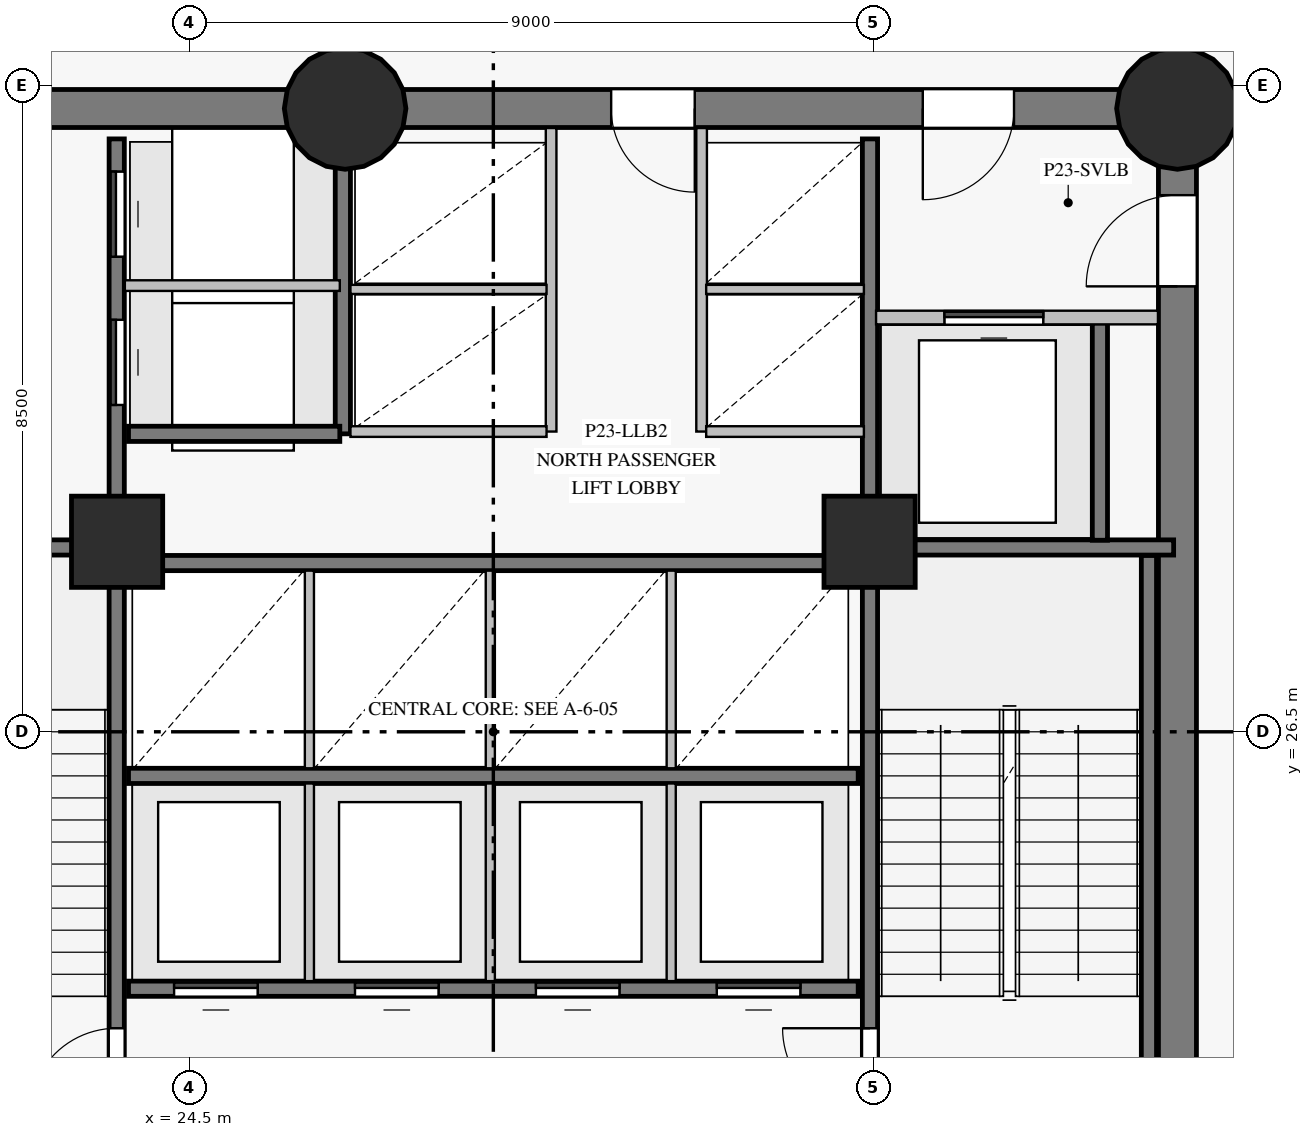
"""IFC4 building model, lengths in metres.
Left out: names, types, materials, properties, quantities, classifications, styles, units other than length and angle.
Written with IfcOpenShell. Run it as: python <this file> out.ifc"""

import sys

from ifc_helpers import new_model, si_unit, direction, frame, frame_2d, origin, origin_with_axes, origin_2d, place, context, subcontext, project, spatial, rectangle, circle, extrude, source, transform, mapped, element, fill, save


model = new_model("IFC4")
c1 = context("Model", 3, precision=1e-05, world=origin(), true_north=direction((0.0, 1.0)))
c2 = subcontext(c1, "Body", "Model", "MODEL_VIEW")
j1 = project(units=[si_unit("LENGTHUNIT", "METRE"), si_unit("PLANEANGLEUNIT", "RADIAN")], contexts=[c1])
p1 = place(None, origin())
s1 = spatial("IfcSite", under=j1, at=p1, CompositionType="ELEMENT")
p2 = place(p1, origin())
s2 = spatial("IfcBuilding", under=s1, at=p2, CompositionType="ELEMENT")
p3 = place(p2, frame((0.0, 0.0, 87.7)))
s3 = spatial("IfcBuildingStorey", under=s2, at=p3, CompositionType="ELEMENT", Elevation=87.7)
p4 = place(p3, frame((37.5, 18.3, 0.0), z_axis=(0.0, 0.0, 1.0), x_axis=(0.0, 1.0, 0.0)))
e1 = element("IfcWall", 1, at=p4, inside=s3, PredefinedType="SHEAR", context=c2, shape_type="SweptSolid", body=[
    extrude(rectangle(XDim=16.4, YDim=0.5, at=frame_2d((8.2, 0.0))), origin(), (0.0, 0.0, 1.0), 4.275),
])
p5 = place(p4, frame((14.06, 0.0, 0.0)))
e2 = element("IfcOpeningElement", 2, at=p5, cuts=e1, PredefinedType="OPENING", context=c2, shape_type="SweptSolid", body=[
    extrude(rectangle(XDim=1.2, YDim=2.15, at=frame_2d((0.6, 1.075))), frame((0.0, 0.26, 0.0), z_axis=(0.0, -1.0, 0.0), x_axis=(1.0, 0.0, 0.0)), (0.0, 0.0, 1.0), 0.52),
])
p6 = place(p3, frame((37.5, 34.7, 0.0), z_axis=(0.0, 0.0, 1.0), x_axis=(-1.0, 0.0, 0.0)))
e3 = element("IfcWall", 3, at=p6, inside=s3, PredefinedType="SHEAR", context=c2, shape_type="SweptSolid", body=[
    extrude(rectangle(XDim=10.95, YDim=0.5, at=frame_2d((5.475, 0.0))), origin(), (0.0, 0.0, 1.0), 4.275),
])
p7 = place(p6, frame((2.15, 0.0, 0.0)))
e4 = element("IfcOpeningElement", 4, at=p7, cuts=e3, PredefinedType="OPENING", context=c2, shape_type="SweptSolid", body=[
    extrude(rectangle(XDim=1.2, YDim=2.15, at=frame_2d((0.6, 1.075))), frame((0.0, 0.26, 0.0), z_axis=(0.0, -1.0, 0.0), x_axis=(1.0, 0.0, 0.0)), (0.0, 0.0, 1.0), 0.52),
])
p8 = place(p6, frame((6.35, 0.0, 0.0)))
e5 = element("IfcOpeningElement", 5, at=p8, cuts=e3, PredefinedType="OPENING", context=c2, shape_type="SweptSolid", body=[
    extrude(rectangle(XDim=1.1, YDim=2.15, at=frame_2d((0.55, 1.075))), frame((0.0, 0.26, 0.0), z_axis=(0.0, -1.0, 0.0), x_axis=(1.0, 0.0, 0.0)), (0.0, 0.0, 1.0), 0.52),
])
p9 = place(p3, frame((26.55, 34.7, 0.0), z_axis=(0.0, 0.0, 1.0), x_axis=(-1.0, 0.0, 0.0)))
e6 = element("IfcWall", 6, at=p9, inside=s3, PredefinedType="SHEAR", context=c2, shape_type="SweptSolid", body=[
    extrude(rectangle(XDim=7.05, YDim=0.5, at=frame_2d((3.525, 0.0))), origin(), (0.0, 0.0, 1.0), 4.275),
])
p10 = place(p9, frame((4.25, 0.0, 0.0)))
e7 = element("IfcOpeningElement", 7, at=p10, cuts=e6, PredefinedType="OPENING", context=c2, shape_type="SweptSolid", body=[
    extrude(rectangle(XDim=1.1, YDim=2.15, at=frame_2d((0.55, 1.075))), frame((0.0, 0.26, 0.0), z_axis=(0.0, -1.0, 0.0), x_axis=(1.0, 0.0, 0.0)), (0.0, 0.0, 1.0), 0.52),
])
m1 = source(origin_with_axes(), c2, "Body", "SweptSolid", [
    extrude(circle(Radius=0.8, at=origin_2d()), origin(), (0.0, 0.0, 1.0), 4.5),
])
for number, where, z_axis, x_axis in (
    (8, (26.55, 34.7, 0.0), (0.0, 0.0, 1.0), (1.0, 0.0, 0.0)),
    (9, (37.5, 34.7, 0.0), (0.0, 0.0, 1.0), (1.0, 0.0, 0.0)),
):
    element("IfcColumn", number, at=place(p3, frame(where, z_axis=z_axis, x_axis=x_axis)), inside=s3, PredefinedType="COLUMN", context=c2, shape_type="MappedRepresentation", body=[
        mapped(m1, transform((0.0, 0.0, 0.0), scale=1.0)),
    ])
m2 = source(origin_with_axes(), c2, "Body", "SweptSolid", [
    extrude(rectangle(XDim=1.2, YDim=1.2, at=origin_2d()), origin(), (0.0, 0.0, 1.0), 4.5),
])
for number, where, z_axis, x_axis in (
    (10, (23.55, 29.0, 0.0), (0.0, 0.0, 1.0), (1.0, 0.0, 0.0)),
    (11, (33.45, 29.0, 0.0), (0.0, 0.0, 1.0), (1.0, 0.0, 0.0)),
):
    element("IfcColumn", number, at=place(p3, frame(where, z_axis=z_axis, x_axis=x_axis)), inside=s3, PredefinedType="COLUMN", context=c2, shape_type="MappedRepresentation", body=[
        mapped(m2, transform((0.0, 0.0, 0.0), scale=1.0)),
    ])
p11 = place(p3, frame((23.545, 18.7, 0.0), z_axis=(0.0, 0.0, 1.0), x_axis=(0.0, 1.0, 0.0)))
e12 = element("IfcWall", 12, at=p11, inside=s3, PredefinedType="SHEAR", context=c2, shape_type="SweptSolid", body=[
    extrude(rectangle(XDim=15.6, YDim=0.2, at=frame_2d((7.8, 0.0))), origin(), (0.0, 0.0, 1.0), 4.275),
])
p12 = place(p11, frame((2.75, 0.0, 0.0)))
e13 = element("IfcOpeningElement", 13, at=p12, cuts=e12, PredefinedType="OPENING", context=c2, shape_type="SweptSolid", body=[
    extrude(rectangle(XDim=1.15, YDim=2.15, at=frame_2d((0.575, 1.075))), frame((0.0, 0.11, 0.0), z_axis=(0.0, -1.0, 0.0), x_axis=(1.0, 0.0, 0.0)), (0.0, 0.0, 1.0), 0.22),
])
p13 = place(p11, frame((0.14, 0.0, 0.0)))
e14 = element("IfcOpeningElement", 14, at=p13, cuts=e12, PredefinedType="OPENING", context=c2, shape_type="SweptSolid", body=[
    extrude(rectangle(XDim=0.88, YDim=2.1, at=frame_2d((0.44, 1.05))), frame((0.0, 0.11, 0.0), z_axis=(0.0, -1.0, 0.0), x_axis=(1.0, 0.0, 0.0)), (0.0, 0.0, 1.0), 0.22),
])
p14 = place(p11, frame((1.36, 0.0, 0.0)))
e15 = element("IfcOpeningElement", 15, at=p14, cuts=e12, PredefinedType="OPENING", context=c2, shape_type="SweptSolid", body=[
    extrude(rectangle(XDim=0.88, YDim=2.1, at=frame_2d((0.44, 1.05))), frame((0.0, 0.11, 0.0), z_axis=(0.0, -1.0, 0.0), x_axis=(1.0, 0.0, 0.0)), (0.0, 0.0, 1.0), 0.22),
])
p15 = place(p11, frame((12.1, 0.0, 0.0)))
e16 = element("IfcOpeningElement", 16, at=p15, cuts=e12, PredefinedType="OPENING", context=c2, shape_type="SweptSolid", body=[
    extrude(rectangle(XDim=1.12, YDim=2.15, at=frame_2d((0.56, 1.075))), frame((0.0, 0.11, 0.0), z_axis=(0.0, -1.0, 0.0), x_axis=(1.0, 0.0, 0.0)), (0.0, 0.0, 1.0), 0.22),
])
p16 = place(p11, frame((14.05, 0.0, 0.0)))
e17 = element("IfcOpeningElement", 17, at=p16, cuts=e12, PredefinedType="OPENING", context=c2, shape_type="SweptSolid", body=[
    extrude(rectangle(XDim=1.12, YDim=2.15, at=frame_2d((0.56, 1.075))), frame((0.0, 0.11, 0.0), z_axis=(0.0, -1.0, 0.0), x_axis=(1.0, 0.0, 0.0)), (0.0, 0.0, 1.0), 0.22),
])
p17 = place(p3, frame((33.455, 18.7, 0.0), z_axis=(0.0, 0.0, 1.0), x_axis=(0.0, 1.0, 0.0)))
e18 = element("IfcWall", 18, at=p17, inside=s3, PredefinedType="SHEAR", context=c2, shape_type="SweptSolid", body=[
    extrude(rectangle(XDim=15.6, YDim=0.2, at=frame_2d((7.8, 0.0))), origin(), (0.0, 0.0, 1.0), 4.275),
])
p18 = place(p17, frame((2.75, 0.0, 0.0)))
e19 = element("IfcOpeningElement", 19, at=p18, cuts=e18, PredefinedType="OPENING", context=c2, shape_type="SweptSolid", body=[
    extrude(rectangle(XDim=1.15, YDim=2.15, at=frame_2d((0.575, 1.075))), frame((0.0, 0.11, 0.0), z_axis=(0.0, -1.0, 0.0), x_axis=(1.0, 0.0, 0.0)), (0.0, 0.0, 1.0), 0.22),
])
p19 = place(p17, frame((0.55, 0.0, 0.0)))
e20 = element("IfcOpeningElement", 20, at=p19, cuts=e18, PredefinedType="OPENING", context=c2, shape_type="SweptSolid", body=[
    extrude(rectangle(XDim=0.94, YDim=2.1, at=frame_2d((0.47, 1.05))), frame((0.0, 0.11, 0.0), z_axis=(0.0, -1.0, 0.0), x_axis=(1.0, 0.0, 0.0)), (0.0, 0.0, 1.0), 0.22),
])
p20 = place(p3, frame((23.7, 23.12, 0.0), z_axis=(0.0, 0.0, 1.0), x_axis=(1.0, 0.0, 0.0)))
e21 = element("IfcWall", 21, at=p20, inside=s3, PredefinedType="SHEAR", context=c2, shape_type="SweptSolid", body=[
    extrude(rectangle(XDim=9.6, YDim=0.2, at=frame_2d((4.8, 0.0))), origin(), (0.0, 0.0, 1.0), 4.275),
])
p21 = place(p20, frame((0.6, 0.0, 0.0)))
e22 = element("IfcOpeningElement", 22, at=p21, cuts=e21, PredefinedType="OPENING", context=c2, shape_type="SweptSolid", body=[
    extrude(rectangle(XDim=1.1, YDim=2.15, at=frame_2d((0.55, 1.075))), frame((0.0, 0.11, 0.0), z_axis=(0.0, -1.0, 0.0), x_axis=(1.0, 0.0, 0.0)), (0.0, 0.0, 1.0), 0.22),
])
p22 = place(p20, frame((2.98, 0.0, 0.0)))
e23 = element("IfcOpeningElement", 23, at=p22, cuts=e21, PredefinedType="OPENING", context=c2, shape_type="SweptSolid", body=[
    extrude(rectangle(XDim=1.1, YDim=2.15, at=frame_2d((0.55, 1.075))), frame((0.0, 0.11, 0.0), z_axis=(0.0, -1.0, 0.0), x_axis=(1.0, 0.0, 0.0)), (0.0, 0.0, 1.0), 0.22),
])
p23 = place(p20, frame((5.36, 0.0, 0.0)))
e24 = element("IfcOpeningElement", 24, at=p23, cuts=e21, PredefinedType="OPENING", context=c2, shape_type="SweptSolid", body=[
    extrude(rectangle(XDim=1.1, YDim=2.15, at=frame_2d((0.55, 1.075))), frame((0.0, 0.11, 0.0), z_axis=(0.0, -1.0, 0.0), x_axis=(1.0, 0.0, 0.0)), (0.0, 0.0, 1.0), 0.22),
])
p24 = place(p20, frame((7.74, 0.0, 0.0)))
e25 = element("IfcOpeningElement", 25, at=p24, cuts=e21, PredefinedType="OPENING", context=c2, shape_type="SweptSolid", body=[
    extrude(rectangle(XDim=1.1, YDim=2.15, at=frame_2d((0.55, 1.075))), frame((0.0, 0.11, 0.0), z_axis=(0.0, -1.0, 0.0), x_axis=(1.0, 0.0, 0.0)), (0.0, 0.0, 1.0), 0.22),
])
for number, where, z_axis, x_axis in (
    (26, (23.7, 25.92, 0.0), (0.0, 0.0, 1.0), (1.0, 0.0, 0.0)),
    (27, (23.7, 28.72, 0.0), (0.0, 0.0, 1.0), (1.0, 0.0, 0.0)),
):
    element("IfcWall", number, at=place(p3, frame(where, z_axis=z_axis, x_axis=x_axis)), inside=s3, PredefinedType="SHEAR", context=c2, shape_type="SweptSolid", body=[
        extrude(rectangle(XDim=9.6, YDim=0.2, at=frame_2d((4.8, 0.0))), origin(), (0.0, 0.0, 1.0), 4.275),
    ])
p25 = place(p3, frame((37.125, 21.32, 0.0), z_axis=(0.0, 0.0, 1.0), x_axis=(0.0, 1.0, 0.0)))
e28 = element("IfcWall", 28, at=p25, inside=s3, PredefinedType="SHEAR", context=c2, shape_type="SweptSolid", body=[
    extrude(rectangle(XDim=7.5, YDim=0.2, at=frame_2d((3.75, 0.0))), origin(), (0.0, 0.0, 1.0), 4.275),
])
for number, where, z_axis, x_axis in (
    (29, (33.455, 28.925, 0.0), (0.0, 0.0, 1.0), (1.0, 0.0, 0.0)),
    (30, (19.55, 28.925, 0.0), (0.0, 0.0, 1.0), (1.0, 0.0, 0.0)),
):
    element("IfcWall", number, at=place(p3, frame(where, z_axis=z_axis, x_axis=x_axis)), inside=s3, PredefinedType="SHEAR", context=c2, shape_type="SweptSolid", body=[
        extrude(rectangle(XDim=3.995, YDim=0.2, at=frame_2d((1.998, 0.0))), origin(), (0.0, 0.0, 1.0), 4.275),
    ])
p26 = place(p3, frame((26.52, 30.42, 0.0), z_axis=(0.0, 0.0, 1.0), x_axis=(0.0, 1.0, 0.0)))
e31 = element("IfcWall", 31, at=p26, inside=s3, PredefinedType="SHEAR", context=c2, shape_type="SweptSolid", body=[
    extrude(rectangle(XDim=3.86, YDim=0.2, at=frame_2d((1.93, 0.0))), origin(), (0.0, 0.0, 1.0), 4.275),
])
p27 = place(p3, frame((36.48, 29.02, 0.0), z_axis=(0.0, 0.0, 1.0), x_axis=(0.0, 1.0, 0.0)))
e32 = element("IfcWall", 32, at=p27, inside=s3, PredefinedType="SHEAR", context=c2, shape_type="SweptSolid", body=[
    extrude(rectangle(XDim=2.86, YDim=0.2, at=frame_2d((1.43, 0.0))), origin(), (0.0, 0.0, 1.0), 4.275),
])
p28 = place(p3, frame((23.7, 30.42, 0.0), z_axis=(0.0, 0.0, 1.0), x_axis=(1.0, 0.0, 0.0)))
e33 = element("IfcWall", 33, at=p28, inside=s3, PredefinedType="SHEAR", context=c2, shape_type="SweptSolid", body=[
    extrude(rectangle(XDim=2.78, YDim=0.2, at=frame_2d((1.39, 0.0))), origin(), (0.0, 0.0, 1.0), 4.275),
])
for number, where, z_axis, x_axis in (
    (34, (29.26, 30.45, 0.0), (0.0, 0.0, 1.0), (0.0, 1.0, 0.0)),
    (35, (31.24, 30.45, 0.0), (0.0, 0.0, 1.0), (0.0, 1.0, 0.0)),
):
    element("IfcWall", number, at=place(p3, frame(where, z_axis=z_axis, x_axis=x_axis)), inside=s3, PredefinedType="PARTITIONING", context=c2, shape_type="SweptSolid", body=[
        extrude(rectangle(XDim=3.993, YDim=0.14, at=frame_2d((1.997, 0.0))), origin(), (0.0, 0.0, 1.0), 4.275),
    ])
p29 = place(p3, frame((33.535, 31.95, 0.0), z_axis=(0.0, 0.0, 1.0), x_axis=(1.0, 0.0, 0.0)))
e36 = element("IfcWall", 36, at=p29, inside=s3, PredefinedType="PARTITIONING", context=c2, shape_type="SweptSolid", body=[
    extrude(rectangle(XDim=3.709, YDim=0.18, at=frame_2d((1.854, 0.0))), origin(), (0.0, 0.0, 1.0), 4.275),
])
p30 = place(p29, frame((0.9, 0.0, 0.0)))
e37 = element("IfcOpeningElement", 37, at=p30, cuts=e36, PredefinedType="OPENING", context=c2, shape_type="SweptSolid", body=[
    extrude(rectangle(XDim=1.3, YDim=2.2, at=frame_2d((0.65, 1.1))), frame((0.0, 0.1, 0.0), z_axis=(0.0, -1.0, 0.0), x_axis=(1.0, 0.0, 0.0)), (0.0, 0.0, 1.0), 0.2),
])
p31 = place(p3, frame((23.652, 32.37, 0.0), z_axis=(0.0, 0.0, 1.0), x_axis=(1.0, 0.0, 0.0)))
e38 = element("IfcWall", 38, at=p31, inside=s3, PredefinedType="PARTITIONING", context=c2, shape_type="SweptSolid", body=[
    extrude(rectangle(XDim=2.828, YDim=0.14, at=frame_2d((1.414, 0.0))), origin(), (0.0, 0.0, 1.0), 4.275),
])
for number, where, z_axis, x_axis in (
    (39, (26.08, 23.22, 0.0), (0.0, 0.0, 1.0), (0.0, 1.0, 0.0)),
    (40, (28.46, 23.22, 0.0), (0.0, 0.0, 1.0), (0.0, 1.0, 0.0)),
    (41, (30.84, 23.22, 0.0), (0.0, 0.0, 1.0), (0.0, 1.0, 0.0)),
    (42, (26.08, 26.02, 0.0), (0.0, 0.0, 1.0), (0.0, 1.0, 0.0)),
    (43, (28.46, 26.02, 0.0), (0.0, 0.0, 1.0), (0.0, 1.0, 0.0)),
    (44, (30.84, 26.02, 0.0), (0.0, 0.0, 1.0), (0.0, 1.0, 0.0)),
):
    element("IfcWall", number, at=place(p3, frame(where, z_axis=z_axis, x_axis=x_axis)), inside=s3, PredefinedType="PARTITIONING", context=c2, shape_type="SweptSolid", body=[
        extrude(rectangle(XDim=2.6, YDim=0.12, at=frame_2d((1.3, 0.0))), origin(), (0.0, 0.0, 1.0), 4.275),
    ])
p32 = place(p3, frame((26.62, 30.45, 0.0), z_axis=(0.0, 0.0, 1.0), x_axis=(1.0, 0.0, 0.0)))
e45 = element("IfcWall", 45, at=p32, inside=s3, PredefinedType="PARTITIONING", context=c2, shape_type="SweptSolid", body=[
    extrude(rectangle(XDim=2.58, YDim=0.14, at=frame_2d((1.29, 0.0))), origin(), (0.0, 0.0, 1.0), 4.275),
])
p33 = place(p3, frame((26.62, 32.32, 0.0), z_axis=(0.0, 0.0, 1.0), x_axis=(1.0, 0.0, 0.0)))
e46 = element("IfcWall", 46, at=p33, inside=s3, PredefinedType="PARTITIONING", context=c2, shape_type="SweptSolid", body=[
    extrude(rectangle(XDim=2.58, YDim=0.12, at=frame_2d((1.29, 0.0))), origin(), (0.0, 0.0, 1.0), 4.275),
])
p34 = place(p3, frame((31.3, 30.45, 0.0), z_axis=(0.0, 0.0, 1.0), x_axis=(1.0, 0.0, 0.0)))
e47 = element("IfcWall", 47, at=p34, inside=s3, PredefinedType="PARTITIONING", context=c2, shape_type="SweptSolid", body=[
    extrude(rectangle(XDim=2.075, YDim=0.14, at=frame_2d((1.038, 0.0))), origin(), (0.0, 0.0, 1.0), 4.275),
])
p35 = place(p3, frame((31.3, 32.32, 0.0), z_axis=(0.0, 0.0, 1.0), x_axis=(1.0, 0.0, 0.0)))
e48 = element("IfcWall", 48, at=p35, inside=s3, PredefinedType="PARTITIONING", context=c2, shape_type="SweptSolid", body=[
    extrude(rectangle(XDim=2.075, YDim=0.12, at=frame_2d((1.038, 0.0))), origin(), (0.0, 0.0, 1.0), 4.275),
])
m3 = source(origin_with_axes(), c2, "Body", "SweptSolid", [
    extrude(rectangle(XDim=1.15, YDim=2.15, at=frame_2d((0.575, 1.075))), frame((0.0, 0.025, 0.0), z_axis=(0.0, -1.0, 0.0), x_axis=(1.0, 0.0, 0.0)), (0.0, 0.0, 1.0), 0.05),
])
p36 = place(p12, origin())
e49 = element("IfcDoor", 49, at=p36, inside=s3, OperationType="SINGLE_SWING_LEFT", PredefinedType="DOOR", context=c2, shape_type="MappedRepresentation", body=[
    mapped(m3, transform((0.0, 0.0, 0.0), scale=1.0)),
])
fill(e13, e49)
p37 = place(p18, origin())
e50 = element("IfcDoor", 50, at=p37, inside=s3, OperationType="SINGLE_SWING_RIGHT", PredefinedType="DOOR", context=c2, shape_type="MappedRepresentation", body=[
    mapped(m3, transform((0.0, 0.0, 0.0), scale=1.0)),
])
fill(e19, e50)
m4 = source(origin_with_axes(), c2, "Body", "SweptSolid", [
    extrude(rectangle(XDim=1.2, YDim=2.15, at=frame_2d((0.6, 1.075))), frame((0.0, 0.025, 0.0), z_axis=(0.0, -1.0, 0.0), x_axis=(1.0, 0.0, 0.0)), (0.0, 0.0, 1.0), 0.05),
])
p38 = place(p5, origin())
e51 = element("IfcDoor", 51, at=p38, inside=s3, OperationType="SINGLE_SWING_LEFT", PredefinedType="DOOR", context=c2, shape_type="MappedRepresentation", body=[
    mapped(m4, transform((0.0, 0.0, 0.0), scale=1.0)),
])
fill(e2, e51)
p39 = place(p7, origin())
e52 = element("IfcDoor", 52, at=p39, inside=s3, OperationType="SINGLE_SWING_RIGHT", PredefinedType="DOOR", context=c2, shape_type="MappedRepresentation", body=[
    mapped(m4, transform((0.0, 0.0, 0.0), scale=1.0)),
])
fill(e4, e52)
m5 = source(origin_with_axes(), c2, "Body", "SweptSolid", [
    extrude(rectangle(XDim=1.3, YDim=2.2, at=frame_2d((0.65, 1.1))), frame((0.0, 0.025, 0.0), z_axis=(0.0, -1.0, 0.0), x_axis=(1.0, 0.0, 0.0)), (0.0, 0.0, 1.0), 0.05),
])
p40 = place(p30, origin())
e53 = element("IfcDoor", 53, at=p40, inside=s3, OperationType="SLIDING_TO_LEFT", PredefinedType="DOOR", context=c2, shape_type="MappedRepresentation", body=[
    mapped(m5, transform((0.0, 0.0, 0.0), scale=1.0)),
])
fill(e37, e53)
m6 = source(origin_with_axes(), c2, "Body", "SweptSolid", [
    extrude(rectangle(XDim=1.1, YDim=2.15, at=frame_2d((0.55, 1.075))), frame((0.0, 0.025, 0.0), z_axis=(0.0, -1.0, 0.0), x_axis=(1.0, 0.0, 0.0)), (0.0, 0.0, 1.0), 0.05),
])
p41 = place(p21, origin())
e54 = element("IfcDoor", 54, at=p41, inside=s3, OperationType="SLIDING_TO_LEFT", PredefinedType="DOOR", context=c2, shape_type="MappedRepresentation", body=[
    mapped(m6, transform((0.0, 0.0, 0.0), scale=1.0)),
])
fill(e22, e54)
p42 = place(p22, origin())
e55 = element("IfcDoor", 55, at=p42, inside=s3, OperationType="SLIDING_TO_RIGHT", PredefinedType="DOOR", context=c2, shape_type="MappedRepresentation", body=[
    mapped(m6, transform((0.0, 0.0, 0.0), scale=1.0)),
])
fill(e23, e55)
p43 = place(p23, origin())
e56 = element("IfcDoor", 56, at=p43, inside=s3, OperationType="SLIDING_TO_LEFT", PredefinedType="DOOR", context=c2, shape_type="MappedRepresentation", body=[
    mapped(m6, transform((0.0, 0.0, 0.0), scale=1.0)),
])
fill(e24, e56)
p44 = place(p24, origin())
e57 = element("IfcDoor", 57, at=p44, inside=s3, OperationType="SLIDING_TO_RIGHT", PredefinedType="DOOR", context=c2, shape_type="MappedRepresentation", body=[
    mapped(m6, transform((0.0, 0.0, 0.0), scale=1.0)),
])
fill(e25, e57)
p45 = place(p8, origin())
e58 = element("IfcDoor", 58, at=p45, inside=s3, OperationType="SINGLE_SWING_LEFT", PredefinedType="DOOR", context=c2, shape_type="MappedRepresentation", body=[
    mapped(m6, transform((0.0, 0.0, 0.0), scale=1.0)),
])
fill(e5, e58)
m7 = source(origin_with_axes(), c2, "Body", "SweptSolid", [
    extrude(rectangle(XDim=1.12, YDim=2.15, at=frame_2d((0.56, 1.075))), frame((0.0, 0.025, 0.0), z_axis=(0.0, -1.0, 0.0), x_axis=(1.0, 0.0, 0.0)), (0.0, 0.0, 1.0), 0.05),
])
p46 = place(p15, origin())
e59 = element("IfcDoor", 59, at=p46, inside=s3, OperationType="SLIDING_TO_LEFT", PredefinedType="DOOR", context=c2, shape_type="MappedRepresentation", body=[
    mapped(m7, transform((0.0, 0.0, 0.0), scale=1.0)),
])
fill(e16, e59)
p47 = place(p16, origin())
e60 = element("IfcDoor", 60, at=p47, inside=s3, OperationType="SLIDING_TO_RIGHT", PredefinedType="DOOR", context=c2, shape_type="MappedRepresentation", body=[
    mapped(m7, transform((0.0, 0.0, 0.0), scale=1.0)),
])
fill(e17, e60)
save(model, sys.argv[1])
